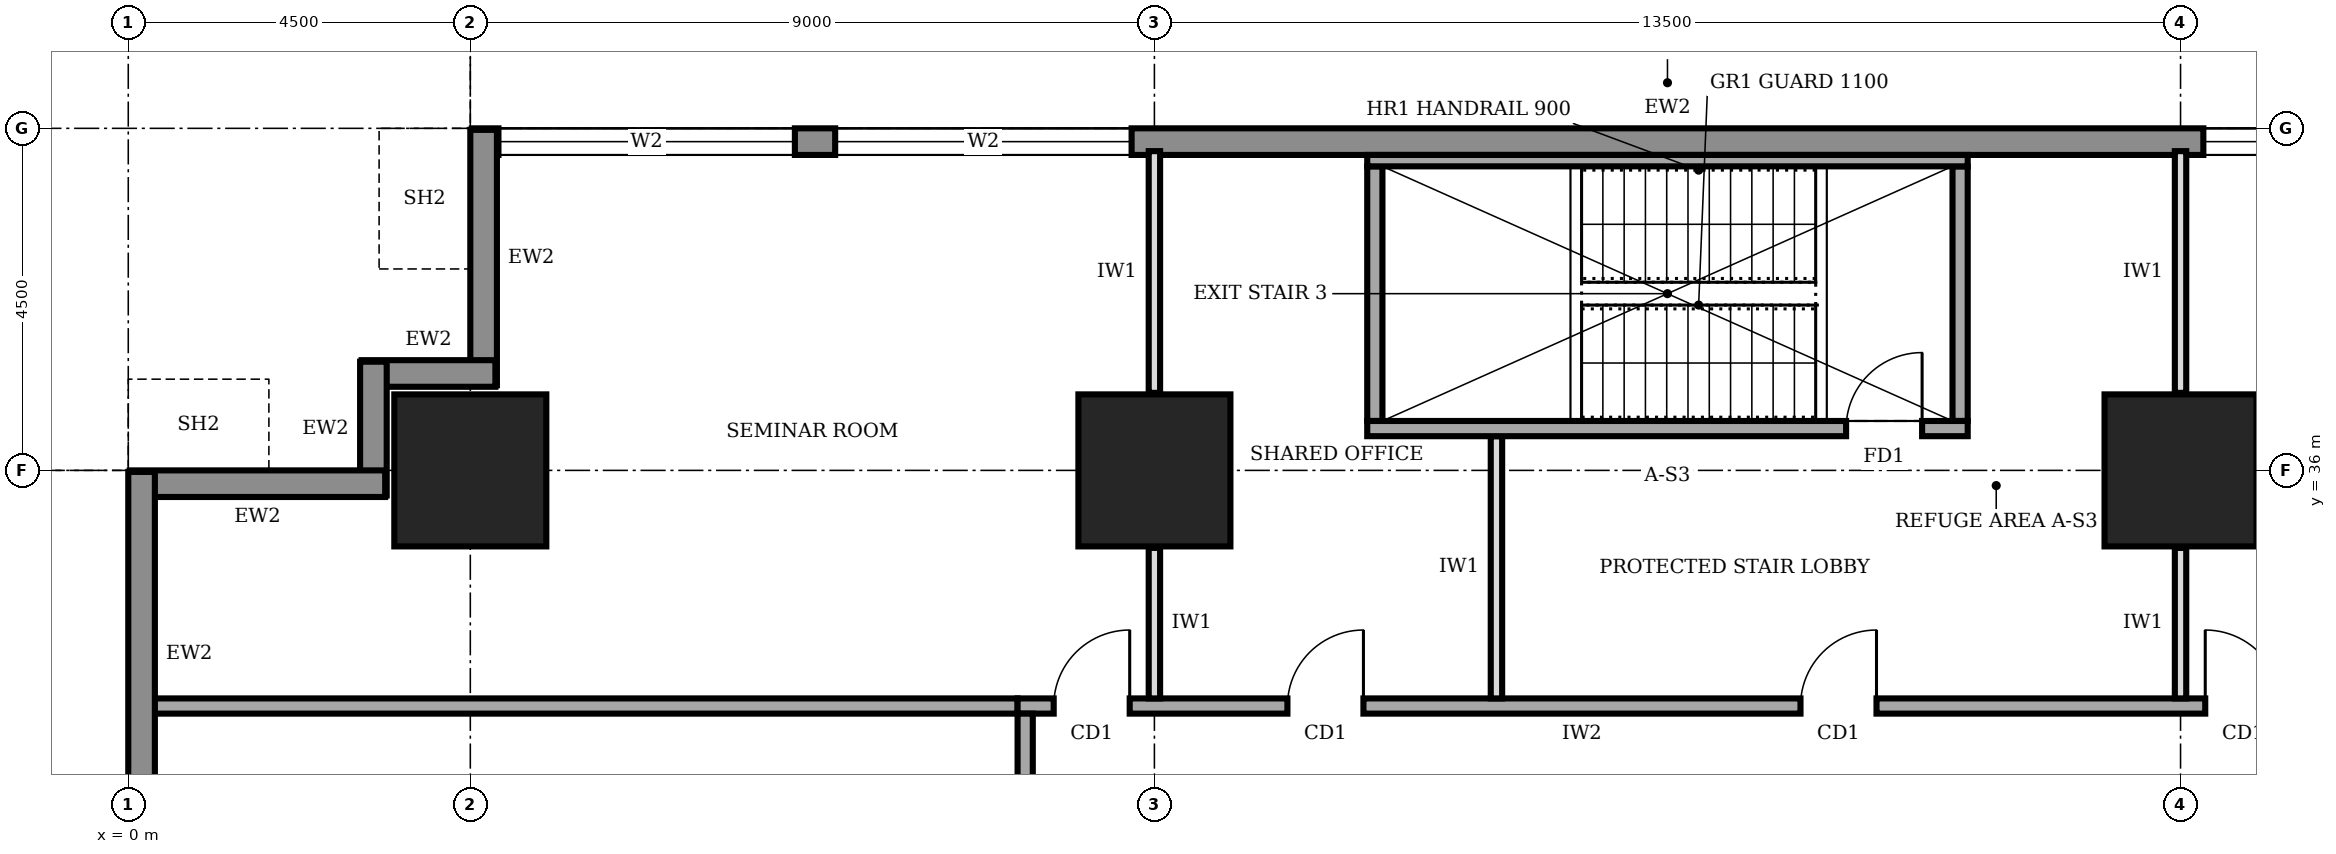
"""IFC4 building model, lengths in metres.
Left out: names, types, materials, properties, quantities, classifications, styles, units other than length and angle.
Written with IfcOpenShell. Run it as: python <this file> out.ifc"""

import sys

from ifc_helpers import new_model, si_unit, direction, frame, frame_2d, origin, origin_2d, place, context, subcontext, project, spatial, rectangle, extrude, element, fill, save


model = new_model("IFC4")
c1 = context("Model", 3, precision=1e-05, world=origin(), true_north=direction((0.0, 1.0)))
c2 = subcontext(c1, "Body", "Model", "MODEL_VIEW")
j1 = project(units=[si_unit("LENGTHUNIT", "METRE"), si_unit("PLANEANGLEUNIT", "RADIAN")], contexts=[c1])
p1 = place(None, origin())
s1 = spatial("IfcSite", under=j1, at=p1, CompositionType="ELEMENT")
p2 = place(p1, origin())
s2 = spatial("IfcBuilding", under=s1, at=p2, CompositionType="ELEMENT")
p3 = place(p2, frame((0.0, 0.0, 49.0)))
s3 = spatial("IfcBuildingStorey", under=s2, at=p3, CompositionType="ELEMENT", Elevation=49.0)
for number, where, z_axis, x_axis in (
    (1, (4.5, 36.0, 0.0), (0.0, 0.0, 1.0), (1.0, 0.0, 0.0)),
    (2, (13.5, 36.0, 0.0), (0.0, 0.0, 1.0), (1.0, 0.0, 0.0)),
    (3, (27.0, 36.0, 0.0), (0.0, 0.0, 1.0), (1.0, 0.0, 0.0)),
):
    element("IfcColumn", number, at=place(p3, frame(where, z_axis=z_axis, x_axis=x_axis)), inside=s3, PredefinedType="COLUMN", context=c2, shape_type="SweptSolid", body=[
        extrude(rectangle(XDim=2.0, YDim=2.0, at=origin_2d()), origin(), (0.0, 0.0, 1.0), 4.0),
    ])
p4 = place(p3, frame((35.98, 40.325, 0.0), z_axis=(0.0, 0.0, 1.0), x_axis=(-1.0, 0.0, 0.0)))
e4 = element("IfcWall", 4, at=p4, inside=s3, PredefinedType="STANDARD", context=c2, shape_type="SweptSolid", body=[
    extrude(rectangle(XDim=31.46, YDim=0.35, at=frame_2d((15.73, 0.0))), origin(), (0.0, 0.0, 1.0), 3.75),
])
p5 = place(p4, frame((27.21, 0.0, 0.6)))
e5 = element("IfcOpeningElement", 5, at=p5, cuts=e4, PredefinedType="OPENING", context=c2, shape_type="SweptSolid", body=[
    extrude(rectangle(XDim=3.9, YDim=2.6, at=frame_2d((1.95, 1.3))), frame((0.0, 0.185, 0.0), z_axis=(0.0, -1.0, 0.0), x_axis=(1.0, 0.0, 0.0)), (0.0, 0.0, 1.0), 0.37),
])
p6 = place(p4, frame((22.78, 0.0, 0.6)))
e6 = element("IfcOpeningElement", 6, at=p6, cuts=e4, PredefinedType="OPENING", context=c2, shape_type="SweptSolid", body=[
    extrude(rectangle(XDim=3.9, YDim=2.6, at=frame_2d((1.95, 1.3))), frame((0.0, 0.185, 0.0), z_axis=(0.0, -1.0, 0.0), x_axis=(1.0, 0.0, 0.0)), (0.0, 0.0, 1.0), 0.37),
])
p7 = place(p4, frame((4.78, 0.0, 0.6)))
e7 = element("IfcOpeningElement", 7, at=p7, cuts=e4, PredefinedType="OPENING", context=c2, shape_type="SweptSolid", body=[
    extrude(rectangle(XDim=3.9, YDim=2.6, at=frame_2d((1.95, 1.3))), frame((0.0, 0.185, 0.0), z_axis=(0.0, -1.0, 0.0), x_axis=(1.0, 0.0, 0.0)), (0.0, 0.0, 1.0), 0.37),
])
p8 = place(p3, frame((4.675, 40.48, 0.0), z_axis=(0.0, 0.0, 1.0), x_axis=(0.0, -1.0, 0.0)))
e8 = element("IfcWall", 8, at=p8, inside=s3, PredefinedType="STANDARD", context=c2, shape_type="SweptSolid", body=[
    extrude(rectangle(XDim=3.36, YDim=0.35, at=frame_2d((1.68, 0.0))), origin(), (0.0, 0.0, 1.0), 2.85),
])
for number, where, z_axis, x_axis in (
    (9, (4.83, 37.275, 0.0), (0.0, 0.0, 1.0), (-1.0, 0.0, 0.0)),
    (10, (3.225, 37.43, 0.0), (0.0, 0.0, 1.0), (0.0, -1.0, 0.0)),
):
    element("IfcWall", number, at=place(p3, frame(where, z_axis=z_axis, x_axis=x_axis)), inside=s3, PredefinedType="STANDARD", context=c2, shape_type="SweptSolid", body=[
        extrude(rectangle(XDim=1.76, YDim=0.35, at=frame_2d((0.88, 0.0))), origin(), (0.0, 0.0, 1.0), 3.75),
    ])
p9 = place(p3, frame((3.38, 35.825, 0.0), z_axis=(0.0, 0.0, 1.0), x_axis=(-1.0, 0.0, 0.0)))
e11 = element("IfcWall", 11, at=p9, inside=s3, PredefinedType="STANDARD", context=c2, shape_type="SweptSolid", body=[
    extrude(rectangle(XDim=3.36, YDim=0.35, at=frame_2d((1.68, 0.0))), origin(), (0.0, 0.0, 1.0), 2.85),
])
p10 = place(p3, frame((0.175, 35.98, 0.0), z_axis=(0.0, 0.0, 1.0), x_axis=(0.0, -1.0, 0.0)))
e12 = element("IfcWall", 12, at=p10, inside=s3, PredefinedType="STANDARD", context=c2, shape_type="SweptSolid", body=[
    extrude(rectangle(XDim=31.46, YDim=0.35, at=frame_2d((15.73, 0.0))), origin(), (0.0, 0.0, 1.0), 3.75),
])
p11 = place(p10, frame((27.21, 0.0, 0.6)))
e13 = element("IfcOpeningElement", 13, at=p11, cuts=e12, PredefinedType="OPENING", context=c2, shape_type="SweptSolid", body=[
    extrude(rectangle(XDim=3.9, YDim=2.6, at=frame_2d((1.95, 1.3))), frame((0.0, 0.185, 0.0), z_axis=(0.0, -1.0, 0.0), x_axis=(1.0, 0.0, 0.0)), (0.0, 0.0, 1.0), 0.37),
])
p12 = place(p10, frame((22.78, 0.0, 0.6)))
e14 = element("IfcOpeningElement", 14, at=p12, cuts=e12, PredefinedType="OPENING", context=c2, shape_type="SweptSolid", body=[
    extrude(rectangle(XDim=3.9, YDim=2.6, at=frame_2d((1.95, 1.3))), frame((0.0, 0.185, 0.0), z_axis=(0.0, -1.0, 0.0), x_axis=(1.0, 0.0, 0.0)), (0.0, 0.0, 1.0), 0.37),
])
p13 = place(p10, frame((18.28, 0.0, 0.6)))
e15 = element("IfcOpeningElement", 15, at=p13, cuts=e12, PredefinedType="OPENING", context=c2, shape_type="SweptSolid", body=[
    extrude(rectangle(XDim=3.9, YDim=2.6, at=frame_2d((1.95, 1.3))), frame((0.0, 0.185, 0.0), z_axis=(0.0, -1.0, 0.0), x_axis=(1.0, 0.0, 0.0)), (0.0, 0.0, 1.0), 0.37),
])
p14 = place(p10, frame((13.78, 0.0, 0.6)))
e16 = element("IfcOpeningElement", 16, at=p14, cuts=e12, PredefinedType="OPENING", context=c2, shape_type="SweptSolid", body=[
    extrude(rectangle(XDim=3.9, YDim=2.6, at=frame_2d((1.95, 1.3))), frame((0.0, 0.185, 0.0), z_axis=(0.0, -1.0, 0.0), x_axis=(1.0, 0.0, 0.0)), (0.0, 0.0, 1.0), 0.37),
])
p15 = place(p10, frame((9.28, 0.0, 0.6)))
e17 = element("IfcOpeningElement", 17, at=p15, cuts=e12, PredefinedType="OPENING", context=c2, shape_type="SweptSolid", body=[
    extrude(rectangle(XDim=3.9, YDim=2.6, at=frame_2d((1.95, 1.3))), frame((0.0, 0.185, 0.0), z_axis=(0.0, -1.0, 0.0), x_axis=(1.0, 0.0, 0.0)), (0.0, 0.0, 1.0), 0.37),
])
p16 = place(p10, frame((4.78, 0.0, 0.6)))
e18 = element("IfcOpeningElement", 18, at=p16, cuts=e12, PredefinedType="OPENING", context=c2, shape_type="SweptSolid", body=[
    extrude(rectangle(XDim=3.9, YDim=2.6, at=frame_2d((1.95, 1.3))), frame((0.0, 0.185, 0.0), z_axis=(0.0, -1.0, 0.0), x_axis=(1.0, 0.0, 0.0)), (0.0, 0.0, 1.0), 0.37),
])
p17 = place(p3, frame((28.6, 32.9, 0.0), z_axis=(0.0, 0.0, 1.0), x_axis=(-1.0, 0.0, 0.0)))
e19 = element("IfcWall", 19, at=p17, inside=s3, PredefinedType="SOLIDWALL", context=c2, shape_type="SweptSolid", body=[
    extrude(rectangle(XDim=16.9, YDim=0.2, at=frame_2d((8.45, 0.0))), origin(), (0.0, 0.0, 1.0), 3.75),
])
p18 = place(p17, frame((15.425, 0.0, 0.0)))
e20 = element("IfcOpeningElement", 20, at=p18, cuts=e19, PredefinedType="OPENING", context=c2, shape_type="SweptSolid", body=[
    extrude(rectangle(XDim=1.0, YDim=2.1, at=frame_2d((0.5, 1.05))), frame((0.0, 0.11, 0.0), z_axis=(0.0, -1.0, 0.0), x_axis=(1.0, 0.0, 0.0)), (0.0, 0.0, 1.0), 0.22),
])
p19 = place(p17, frame((12.35, 0.0, 0.0)))
e21 = element("IfcOpeningElement", 21, at=p19, cuts=e19, PredefinedType="OPENING", context=c2, shape_type="SweptSolid", body=[
    extrude(rectangle(XDim=1.0, YDim=2.1, at=frame_2d((0.5, 1.05))), frame((0.0, 0.11, 0.0), z_axis=(0.0, -1.0, 0.0), x_axis=(1.0, 0.0, 0.0)), (0.0, 0.0, 1.0), 0.22),
])
p20 = place(p17, frame((5.6, 0.0, 0.0)))
e22 = element("IfcOpeningElement", 22, at=p20, cuts=e19, PredefinedType="OPENING", context=c2, shape_type="SweptSolid", body=[
    extrude(rectangle(XDim=1.0, YDim=2.1, at=frame_2d((0.5, 1.05))), frame((0.0, 0.11, 0.0), z_axis=(0.0, -1.0, 0.0), x_axis=(1.0, 0.0, 0.0)), (0.0, 0.0, 1.0), 0.22),
])
p21 = place(p17, frame((0.275, 0.0, 0.0)))
e23 = element("IfcOpeningElement", 23, at=p21, cuts=e19, PredefinedType="OPENING", context=c2, shape_type="SweptSolid", body=[
    extrude(rectangle(XDim=1.0, YDim=2.1, at=frame_2d((0.5, 1.05))), frame((0.0, 0.11, 0.0), z_axis=(0.0, -1.0, 0.0), x_axis=(1.0, 0.0, 0.0)), (0.0, 0.0, 1.0), 0.22),
])
p22 = place(p3, frame((11.8, 32.8, 0.0), z_axis=(0.0, 0.0, 1.0), x_axis=(0.0, -1.0, 0.0)))
e24 = element("IfcWall", 24, at=p22, inside=s3, PredefinedType="SOLIDWALL", context=c2, shape_type="SweptSolid", body=[
    extrude(rectangle(XDim=23.8, YDim=0.2, at=frame_2d((11.9, 0.0))), origin(), (0.0, 0.0, 1.0), 3.75),
])
p23 = place(p22, frame((21.05, 0.0, 0.0)))
e25 = element("IfcOpeningElement", 25, at=p23, cuts=e24, PredefinedType="OPENING", context=c2, shape_type="SweptSolid", body=[
    extrude(rectangle(XDim=1.0, YDim=2.1, at=frame_2d((0.5, 1.05))), frame((0.0, 0.11, 0.0), z_axis=(0.0, -1.0, 0.0), x_axis=(1.0, 0.0, 0.0)), (0.0, 0.0, 1.0), 0.22),
])
p24 = place(p22, frame((17.15, 0.0, 0.0)))
e26 = element("IfcOpeningElement", 26, at=p24, cuts=e24, PredefinedType="OPENING", context=c2, shape_type="SweptSolid", body=[
    extrude(rectangle(XDim=0.9, YDim=2.1, at=frame_2d((0.45, 1.05))), frame((0.0, 0.11, 0.0), z_axis=(0.0, -1.0, 0.0), x_axis=(1.0, 0.0, 0.0)), (0.0, 0.0, 1.0), 0.22),
])
p25 = place(p22, frame((12.35, 0.0, 0.0)))
e27 = element("IfcOpeningElement", 27, at=p25, cuts=e24, PredefinedType="OPENING", context=c2, shape_type="SweptSolid", body=[
    extrude(rectangle(XDim=0.9, YDim=2.1, at=frame_2d((0.45, 1.05))), frame((0.0, 0.11, 0.0), z_axis=(0.0, -1.0, 0.0), x_axis=(1.0, 0.0, 0.0)), (0.0, 0.0, 1.0), 0.22),
])
p26 = place(p22, frame((9.3, 0.0, 0.0)))
e28 = element("IfcOpeningElement", 28, at=p26, cuts=e24, PredefinedType="OPENING", context=c2, shape_type="SweptSolid", body=[
    extrude(rectangle(XDim=0.9, YDim=2.1, at=frame_2d((0.45, 1.05))), frame((0.0, 0.11, 0.0), z_axis=(0.0, -1.0, 0.0), x_axis=(1.0, 0.0, 0.0)), (0.0, 0.0, 1.0), 0.22),
])
p27 = place(p22, frame((6.3, 0.0, 0.0)))
e29 = element("IfcOpeningElement", 29, at=p27, cuts=e24, PredefinedType="OPENING", context=c2, shape_type="SweptSolid", body=[
    extrude(rectangle(XDim=1.0, YDim=2.1, at=frame_2d((0.5, 1.05))), frame((0.0, 0.11, 0.0), z_axis=(0.0, -1.0, 0.0), x_axis=(1.0, 0.0, 0.0)), (0.0, 0.0, 1.0), 0.22),
])
p28 = place(p22, frame((14.4, 0.0, 0.0)))
e30 = element("IfcOpeningElement", 30, at=p28, cuts=e24, PredefinedType="OPENING", context=c2, shape_type="SweptSolid", body=[
    extrude(rectangle(XDim=1.0, YDim=2.1, at=frame_2d((0.5, 1.05))), frame((0.0, 0.11, 0.0), z_axis=(0.0, -1.0, 0.0), x_axis=(1.0, 0.0, 0.0)), (0.0, 0.0, 1.0), 0.22),
])
p29 = place(p22, frame((2.3, 0.0, 0.0)))
e31 = element("IfcOpeningElement", 31, at=p29, cuts=e24, PredefinedType="OPENING", context=c2, shape_type="SweptSolid", body=[
    extrude(rectangle(XDim=1.0, YDim=2.1, at=frame_2d((0.5, 1.05))), frame((0.0, 0.11, 0.0), z_axis=(0.0, -1.0, 0.0), x_axis=(1.0, 0.0, 0.0)), (0.0, 0.0, 1.0), 0.22),
])
p30 = place(p3, frame((0.3, 32.9, 0.0), z_axis=(0.0, 0.0, 1.0), x_axis=(1.0, 0.0, 0.0)))
e32 = element("IfcWall", 32, at=p30, inside=s3, PredefinedType="SOLIDWALL", context=c2, shape_type="SweptSolid", body=[
    extrude(rectangle(XDim=11.4, YDim=0.2, at=frame_2d((5.7, 0.0))), origin(), (0.0, 0.0, 1.0), 3.75),
])
p31 = place(p3, frame((13.5, 33.0, 0.0), z_axis=(0.0, 0.0, 1.0), x_axis=(0.0, 1.0, 0.0)))
e33 = element("IfcWall", 33, at=p31, inside=s3, PredefinedType="PARTITIONING", context=c2, shape_type="SweptSolid", body=[
    extrude(rectangle(XDim=1.98, YDim=0.15, at=frame_2d((0.99, 0.0))), origin(), (0.0, 0.0, 1.0), 2.85),
])
p32 = place(p3, frame((13.5, 37.02, 0.0), z_axis=(0.0, 0.0, 1.0), x_axis=(0.0, 1.0, 0.0)))
e34 = element("IfcWall", 34, at=p32, inside=s3, PredefinedType="PARTITIONING", context=c2, shape_type="SweptSolid", body=[
    extrude(rectangle(XDim=3.18, YDim=0.15, at=frame_2d((1.59, 0.0))), origin(), (0.0, 0.0, 1.0), 2.85),
])
p33 = place(p3, frame((18.0, 33.0, 0.0), z_axis=(0.0, 0.0, 1.0), x_axis=(0.0, 1.0, 0.0)))
e35 = element("IfcWall", 35, at=p33, inside=s3, PredefinedType="PARTITIONING", context=c2, shape_type="SweptSolid", body=[
    extrude(rectangle(XDim=3.45, YDim=0.15, at=frame_2d((1.725, 0.0))), origin(), (0.0, 0.0, 1.0), 3.75),
])
p34 = place(p3, frame((27.0, 33.0, 0.0), z_axis=(0.0, 0.0, 1.0), x_axis=(0.0, 1.0, 0.0)))
e36 = element("IfcWall", 36, at=p34, inside=s3, PredefinedType="PARTITIONING", context=c2, shape_type="SweptSolid", body=[
    extrude(rectangle(XDim=1.98, YDim=0.15, at=frame_2d((0.99, 0.0))), origin(), (0.0, 0.0, 1.0), 2.85),
])
p35 = place(p3, frame((27.0, 37.02, 0.0), z_axis=(0.0, 0.0, 1.0), x_axis=(0.0, 1.0, 0.0)))
e37 = element("IfcWall", 37, at=p35, inside=s3, PredefinedType="PARTITIONING", context=c2, shape_type="SweptSolid", body=[
    extrude(rectangle(XDim=3.18, YDim=0.15, at=frame_2d((1.59, 0.0))), origin(), (0.0, 0.0, 1.0), 2.85),
])
p36 = place(p3, frame((16.3, 36.55, 0.0), z_axis=(0.0, 0.0, 1.0), x_axis=(1.0, 0.0, 0.0)))
e38 = element("IfcWall", 38, at=p36, inside=s3, PredefinedType="SOLIDWALL", context=c2, shape_type="SweptSolid", body=[
    extrude(rectangle(XDim=7.9, YDim=0.2, at=frame_2d((3.95, 0.0))), origin(), (0.0, 0.0, 1.0), 3.75),
])
p37 = place(p36, frame((6.3, 0.0, 0.0)))
e39 = element("IfcOpeningElement", 39, at=p37, cuts=e38, PredefinedType="OPENING", context=c2, shape_type="SweptSolid", body=[
    extrude(rectangle(XDim=1.0, YDim=2.1, at=frame_2d((0.5, 1.05))), frame((0.0, 0.11, 0.0), z_axis=(0.0, -1.0, 0.0), x_axis=(1.0, 0.0, 0.0)), (0.0, 0.0, 1.0), 0.22),
])
p38 = place(p3, frame((16.3, 40.075, 0.0), z_axis=(0.0, 0.0, 1.0), x_axis=(1.0, 0.0, 0.0)))
e40 = element("IfcWall", 40, at=p38, inside=s3, PredefinedType="SOLIDWALL", context=c2, shape_type="SweptSolid", body=[
    extrude(rectangle(XDim=7.9, YDim=0.15, at=frame_2d((3.95, 0.0))), origin(), (0.0, 0.0, 1.0), 3.75),
])
for number, where, z_axis, x_axis in (
    (41, (16.4, 36.65, 0.0), (0.0, 0.0, 1.0), (0.0, 1.0, 0.0)),
    (42, (24.1, 36.65, 0.0), (0.0, 0.0, 1.0), (0.0, 1.0, 0.0)),
):
    element("IfcWall", number, at=place(p3, frame(where, z_axis=z_axis, x_axis=x_axis)), inside=s3, PredefinedType="SOLIDWALL", context=c2, shape_type="SweptSolid", body=[
        extrude(rectangle(XDim=3.35, YDim=0.2, at=frame_2d((1.675, 0.0))), origin(), (0.0, 0.0, 1.0), 3.75),
    ])
p39 = place(p5, origin())
e43 = element("IfcWindow", 43, at=p39, inside=s3, PartitioningType="SINGLE_PANEL", PredefinedType="WINDOW", context=c2, shape_type="SweptSolid", body=[
    extrude(rectangle(XDim=3.9, YDim=2.6, at=frame_2d((1.95, 1.3))), frame((0.0, 0.03, 0.0), z_axis=(0.0, -1.0, 0.0), x_axis=(1.0, 0.0, 0.0)), (0.0, 0.0, 1.0), 0.06),
])
fill(e5, e43)
p40 = place(p6, origin())
e44 = element("IfcWindow", 44, at=p40, inside=s3, PartitioningType="SINGLE_PANEL", PredefinedType="WINDOW", context=c2, shape_type="SweptSolid", body=[
    extrude(rectangle(XDim=3.9, YDim=2.6, at=frame_2d((1.95, 1.3))), frame((0.0, 0.03, 0.0), z_axis=(0.0, -1.0, 0.0), x_axis=(1.0, 0.0, 0.0)), (0.0, 0.0, 1.0), 0.06),
])
fill(e6, e44)
p41 = place(p7, origin())
e45 = element("IfcWindow", 45, at=p41, inside=s3, PartitioningType="SINGLE_PANEL", PredefinedType="WINDOW", context=c2, shape_type="SweptSolid", body=[
    extrude(rectangle(XDim=3.9, YDim=2.6, at=frame_2d((1.95, 1.3))), frame((0.0, 0.03, 0.0), z_axis=(0.0, -1.0, 0.0), x_axis=(1.0, 0.0, 0.0)), (0.0, 0.0, 1.0), 0.06),
])
fill(e7, e45)
p42 = place(p18, frame((1.0, 0.0, 0.0), z_axis=(0.0, 0.0, 1.0), x_axis=(-1.0, 0.0, 0.0)))
e46 = element("IfcDoor", 46, at=p42, inside=s3, OperationType="SINGLE_SWING_RIGHT", PredefinedType="DOOR", context=c2, shape_type="SweptSolid", body=[
    extrude(rectangle(XDim=1.0, YDim=2.1, at=frame_2d((0.5, 1.05))), frame((0.0, 0.025, 0.0), z_axis=(0.0, -1.0, 0.0), x_axis=(1.0, 0.0, 0.0)), (0.0, 0.0, 1.0), 0.05),
])
fill(e20, e46)
p43 = place(p19, frame((1.0, 0.0, 0.0), z_axis=(0.0, 0.0, 1.0), x_axis=(-1.0, 0.0, 0.0)))
e47 = element("IfcDoor", 47, at=p43, inside=s3, OperationType="SINGLE_SWING_RIGHT", PredefinedType="DOOR", context=c2, shape_type="SweptSolid", body=[
    extrude(rectangle(XDim=1.0, YDim=2.1, at=frame_2d((0.5, 1.05))), frame((0.0, 0.025, 0.0), z_axis=(0.0, -1.0, 0.0), x_axis=(1.0, 0.0, 0.0)), (0.0, 0.0, 1.0), 0.05),
])
fill(e21, e47)
p44 = place(p20, frame((1.0, 0.0, 0.0), z_axis=(0.0, 0.0, 1.0), x_axis=(-1.0, 0.0, 0.0)))
e48 = element("IfcDoor", 48, at=p44, inside=s3, OperationType="SINGLE_SWING_RIGHT", PredefinedType="DOOR", context=c2, shape_type="SweptSolid", body=[
    extrude(rectangle(XDim=1.0, YDim=2.1, at=frame_2d((0.5, 1.05))), frame((0.0, 0.025, 0.0), z_axis=(0.0, -1.0, 0.0), x_axis=(1.0, 0.0, 0.0)), (0.0, 0.0, 1.0), 0.05),
])
fill(e22, e48)
p45 = place(p21, frame((1.0, 0.0, 0.0), z_axis=(0.0, 0.0, 1.0), x_axis=(-1.0, 0.0, 0.0)))
e49 = element("IfcDoor", 49, at=p45, inside=s3, OperationType="SINGLE_SWING_LEFT", PredefinedType="DOOR", context=c2, shape_type="SweptSolid", body=[
    extrude(rectangle(XDim=1.0, YDim=2.1, at=frame_2d((0.5, 1.05))), frame((0.0, 0.025, 0.0), z_axis=(0.0, -1.0, 0.0), x_axis=(1.0, 0.0, 0.0)), (0.0, 0.0, 1.0), 0.05),
])
fill(e23, e49)
p46 = place(p37, origin())
e50 = element("IfcDoor", 50, at=p46, inside=s3, OperationType="SINGLE_SWING_RIGHT", PredefinedType="DOOR", context=c2, shape_type="SweptSolid", body=[
    extrude(rectangle(XDim=1.0, YDim=2.1, at=frame_2d((0.5, 1.05))), frame((0.0, 0.025, 0.0), z_axis=(0.0, -1.0, 0.0), x_axis=(1.0, 0.0, 0.0)), (0.0, 0.0, 1.0), 0.05),
])
fill(e39, e50)
save(model, sys.argv[1])
